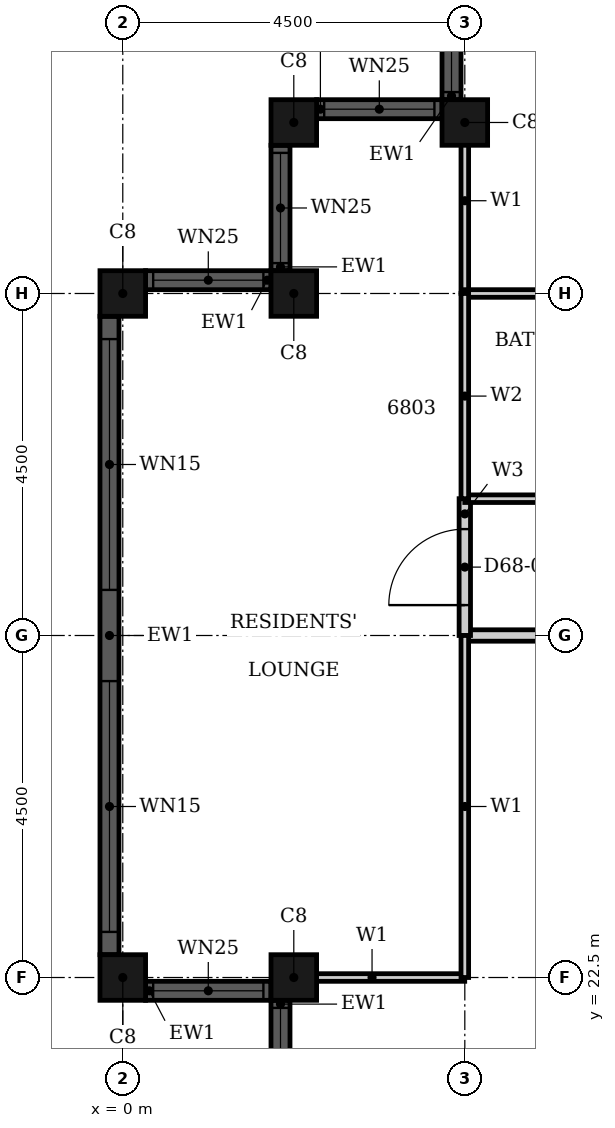
"""IFC4 building model, lengths in metres.
Left out: names, types, materials, properties, quantities, classifications, styles, units other than length and angle.
Written with IfcOpenShell. Run it as: python <this file> out.ifc"""

import sys

from ifc_helpers import new_model, si_unit, direction, frame, frame_2d, origin, origin_2d, place, context, subcontext, project, spatial, rectangle, hollow_rectangle, extrude, element, fill, save


model = new_model("IFC4")
c1 = context("Model", 3, precision=1e-05, world=origin(), true_north=direction((0.0, 1.0)))
c2 = subcontext(c1, "Body", "Model", "MODEL_VIEW")
j1 = project(units=[si_unit("LENGTHUNIT", "METRE"), si_unit("PLANEANGLEUNIT", "RADIAN")], contexts=[c1])
p1 = place(None, origin())
s1 = spatial("IfcSite", under=j1, at=p1, CompositionType="ELEMENT")
p2 = place(p1, origin())
s2 = spatial("IfcBuilding", under=s1, at=p2, CompositionType="ELEMENT")
p3 = place(p2, frame((0.0, 0.0, 267.5)))
s3 = spatial("IfcBuildingStorey", under=s2, at=p3, CompositionType="ELEMENT", Elevation=267.5)
for number, where, z_axis, x_axis in (
    (1, (4.5, 33.75, 0.0), (0.0, 0.0, 1.0), (1.0, 0.0, 0.0)),
    (2, (2.25, 33.75, 0.0), (0.0, 0.0, 1.0), (1.0, 0.0, 0.0)),
    (3, (2.25, 31.5, 0.0), (0.0, 0.0, 1.0), (1.0, 0.0, 0.0)),
    (4, (0.0, 31.5, 0.0), (0.0, 0.0, 1.0), (1.0, 0.0, 0.0)),
    (5, (0.0, 22.5, 0.0), (0.0, 0.0, 1.0), (1.0, 0.0, 0.0)),
    (6, (2.25, 22.5, 0.0), (0.0, 0.0, 1.0), (1.0, 0.0, 0.0)),
):
    element("IfcColumn", number, at=place(p3, frame(where, z_axis=z_axis, x_axis=x_axis)), inside=s3, PredefinedType="COLUMN", context=c2, shape_type="SweptSolid", body=[
        extrude(hollow_rectangle(XDim=0.6, YDim=0.6, WallThickness=0.02, at=origin_2d()), origin(), (0.0, 0.0, 1.0), 3.7),
    ])
p4 = place(p3, frame((4.325, 35.7, 0.0), z_axis=(0.0, 0.0, 1.0), x_axis=(0.0, -1.0, 0.0)))
e7 = element("IfcWall", 7, at=p4, inside=s3, PredefinedType="SOLIDWALL", context=c2, shape_type="SweptSolid", body=[
    extrude(rectangle(XDim=1.65, YDim=0.25, at=frame_2d((0.825, 0.0))), origin(), (0.0, 0.0, 1.0), 3.7),
])
p5 = place(p4, frame((0.1, 0.0, 0.9)))
e8 = element("IfcOpeningElement", 8, at=p5, cuts=e7, PredefinedType="OPENING", context=c2, shape_type="SweptSolid", body=[
    extrude(rectangle(XDim=1.45, YDim=1.85, at=frame_2d((0.725, 0.925))), frame((0.0, 0.135, 0.0), z_axis=(0.0, -1.0, 0.0), x_axis=(1.0, 0.0, 0.0)), (0.0, 0.0, 1.0), 0.27),
])
p6 = place(p3, frame((4.2, 33.925, 0.0), z_axis=(0.0, 0.0, 1.0), x_axis=(-1.0, 0.0, 0.0)))
e9 = element("IfcWall", 9, at=p6, inside=s3, PredefinedType="SOLIDWALL", context=c2, shape_type="SweptSolid", body=[
    extrude(rectangle(XDim=1.65, YDim=0.25, at=frame_2d((0.825, 0.0))), origin(), (0.0, 0.0, 1.0), 3.7),
])
p7 = place(p6, frame((0.1, 0.0, 0.9)))
e10 = element("IfcOpeningElement", 10, at=p7, cuts=e9, PredefinedType="OPENING", context=c2, shape_type="SweptSolid", body=[
    extrude(rectangle(XDim=1.45, YDim=1.85, at=frame_2d((0.725, 0.925))), frame((0.0, 0.135, 0.0), z_axis=(0.0, -1.0, 0.0), x_axis=(1.0, 0.0, 0.0)), (0.0, 0.0, 1.0), 0.27),
])
p8 = place(p3, frame((2.075, 33.45, 0.0), z_axis=(0.0, 0.0, 1.0), x_axis=(0.0, -1.0, 0.0)))
e11 = element("IfcWall", 11, at=p8, inside=s3, PredefinedType="SOLIDWALL", context=c2, shape_type="SweptSolid", body=[
    extrude(rectangle(XDim=1.65, YDim=0.25, at=frame_2d((0.825, 0.0))), origin(), (0.0, 0.0, 1.0), 3.7),
])
p9 = place(p8, frame((0.1, 0.0, 0.9)))
e12 = element("IfcOpeningElement", 12, at=p9, cuts=e11, PredefinedType="OPENING", context=c2, shape_type="SweptSolid", body=[
    extrude(rectangle(XDim=1.45, YDim=1.85, at=frame_2d((0.725, 0.925))), frame((0.0, 0.135, 0.0), z_axis=(0.0, -1.0, 0.0), x_axis=(1.0, 0.0, 0.0)), (0.0, 0.0, 1.0), 0.27),
])
p10 = place(p3, frame((1.95, 31.675, 0.0), z_axis=(0.0, 0.0, 1.0), x_axis=(-1.0, 0.0, 0.0)))
e13 = element("IfcWall", 13, at=p10, inside=s3, PredefinedType="SOLIDWALL", context=c2, shape_type="SweptSolid", body=[
    extrude(rectangle(XDim=1.65, YDim=0.25, at=frame_2d((0.825, 0.0))), origin(), (0.0, 0.0, 1.0), 3.7),
])
p11 = place(p10, frame((0.1, 0.0, 0.9)))
e14 = element("IfcOpeningElement", 14, at=p11, cuts=e13, PredefinedType="OPENING", context=c2, shape_type="SweptSolid", body=[
    extrude(rectangle(XDim=1.45, YDim=1.85, at=frame_2d((0.725, 0.925))), frame((0.0, 0.135, 0.0), z_axis=(0.0, -1.0, 0.0), x_axis=(1.0, 0.0, 0.0)), (0.0, 0.0, 1.0), 0.27),
])
p12 = place(p3, frame((-0.175, 31.2, 0.0), z_axis=(0.0, 0.0, 1.0), x_axis=(0.0, -1.0, 0.0)))
e15 = element("IfcWall", 15, at=p12, inside=s3, PredefinedType="SOLIDWALL", context=c2, shape_type="SweptSolid", body=[
    extrude(rectangle(XDim=8.4, YDim=0.25, at=frame_2d((4.2, 0.0))), origin(), (0.0, 0.0, 1.0), 3.7),
])
p13 = place(p12, frame((0.3, 0.0, 0.45)))
e16 = element("IfcOpeningElement", 16, at=p13, cuts=e15, PredefinedType="OPENING", context=c2, shape_type="SweptSolid", body=[
    extrude(rectangle(XDim=3.3, YDim=2.3, at=frame_2d((1.65, 1.15))), frame((0.0, 0.135, 0.0), z_axis=(0.0, -1.0, 0.0), x_axis=(1.0, 0.0, 0.0)), (0.0, 0.0, 1.0), 0.27),
])
p14 = place(p12, frame((4.8, 0.0, 0.45)))
e17 = element("IfcOpeningElement", 17, at=p14, cuts=e15, PredefinedType="OPENING", context=c2, shape_type="SweptSolid", body=[
    extrude(rectangle(XDim=3.3, YDim=2.3, at=frame_2d((1.65, 1.15))), frame((0.0, 0.135, 0.0), z_axis=(0.0, -1.0, 0.0), x_axis=(1.0, 0.0, 0.0)), (0.0, 0.0, 1.0), 0.27),
])
p15 = place(p3, frame((0.3, 22.325, 0.0), z_axis=(0.0, 0.0, 1.0), x_axis=(1.0, 0.0, 0.0)))
e18 = element("IfcWall", 18, at=p15, inside=s3, PredefinedType="SOLIDWALL", context=c2, shape_type="SweptSolid", body=[
    extrude(rectangle(XDim=1.65, YDim=0.25, at=frame_2d((0.825, 0.0))), origin(), (0.0, 0.0, 1.0), 3.7),
])
p16 = place(p15, frame((0.1, 0.0, 0.9)))
e19 = element("IfcOpeningElement", 19, at=p16, cuts=e18, PredefinedType="OPENING", context=c2, shape_type="SweptSolid", body=[
    extrude(rectangle(XDim=1.45, YDim=1.85, at=frame_2d((0.725, 0.925))), frame((0.0, 0.135, 0.0), z_axis=(0.0, -1.0, 0.0), x_axis=(1.0, 0.0, 0.0)), (0.0, 0.0, 1.0), 0.27),
])
p17 = place(p3, frame((2.075, 22.2, 0.0), z_axis=(0.0, 0.0, 1.0), x_axis=(0.0, -1.0, 0.0)))
e20 = element("IfcWall", 20, at=p17, inside=s3, PredefinedType="SOLIDWALL", context=c2, shape_type="SweptSolid", body=[
    extrude(rectangle(XDim=1.65, YDim=0.25, at=frame_2d((0.825, 0.0))), origin(), (0.0, 0.0, 1.0), 3.7),
])
p18 = place(p17, frame((0.1, 0.0, 0.9)))
e21 = element("IfcOpeningElement", 21, at=p18, cuts=e20, PredefinedType="OPENING", context=c2, shape_type="SweptSolid", body=[
    extrude(rectangle(XDim=1.45, YDim=1.85, at=frame_2d((0.725, 0.925))), frame((0.0, 0.135, 0.0), z_axis=(0.0, -1.0, 0.0), x_axis=(1.0, 0.0, 0.0)), (0.0, 0.0, 1.0), 0.27),
])
p19 = place(p3, frame((4.5, 27.0, 0.0), z_axis=(0.0, 0.0, 1.0), x_axis=(1.0, 0.0, 0.0)))
e22 = element("IfcWall", 22, at=p19, inside=s3, PredefinedType="PARTITIONING", context=c2, shape_type="SweptSolid", body=[
    extrude(rectangle(XDim=13.5, YDim=0.15, at=frame_2d((6.75, 0.0))), origin(), (0.0, 0.0, 1.0), 2.68),
])
p20 = place(p19, frame((5.35, 0.0, 0.0)))
e23 = element("IfcOpeningElement", 23, at=p20, cuts=e22, PredefinedType="OPENING", context=c2, shape_type="SweptSolid", body=[
    extrude(rectangle(XDim=1.0, YDim=2.1, at=frame_2d((0.5, 1.05))), frame((0.0, 0.085, 0.0), z_axis=(0.0, -1.0, 0.0), x_axis=(1.0, 0.0, 0.0)), (0.0, 0.0, 1.0), 0.17),
])
p21 = place(p3, frame((4.5, 27.0, 0.0), z_axis=(0.0, 0.0, 1.0), x_axis=(0.0, 1.0, 0.0)))
e24 = element("IfcWall", 24, at=p21, inside=s3, PredefinedType="PARTITIONING", context=c2, shape_type="SweptSolid", body=[
    extrude(rectangle(XDim=1.8, YDim=0.15, at=frame_2d((0.9, 0.0))), origin(), (0.0, 0.0, 1.0), 3.4),
])
p22 = place(p21, frame((0.4, 0.0, 0.0)))
e25 = element("IfcOpeningElement", 25, at=p22, cuts=e24, PredefinedType="OPENING", context=c2, shape_type="SweptSolid", body=[
    extrude(rectangle(XDim=1.0, YDim=2.1, at=frame_2d((0.5, 1.05))), frame((0.0, 0.085, 0.0), z_axis=(0.0, -1.0, 0.0), x_axis=(1.0, 0.0, 0.0)), (0.0, 0.0, 1.0), 0.17),
])
p23 = place(p3, frame((2.06, 22.5, 0.0), z_axis=(0.0, 0.0, 1.0), x_axis=(1.0, 0.0, 0.0)))
e26 = element("IfcWall", 26, at=p23, inside=s3, PredefinedType="PARTITIONING", context=c2, shape_type="SweptSolid", body=[
    extrude(rectangle(XDim=2.439, YDim=0.1, at=frame_2d((1.219, 0.0))), origin(), (0.0, 0.0, 1.0), 2.68),
])
p24 = place(p3, frame((4.5, 31.501, 0.0), z_axis=(0.0, 0.0, 1.0), x_axis=(0.0, 1.0, 0.0)))
e27 = element("IfcWall", 27, at=p24, inside=s3, PredefinedType="PARTITIONING", context=c2, shape_type="SweptSolid", body=[
    extrude(rectangle(XDim=2.439, YDim=0.1, at=frame_2d((1.219, 0.0))), origin(), (0.0, 0.0, 1.0), 3.4),
])
p25 = place(p3, frame((4.5, 22.5, 0.0), z_axis=(0.0, 0.0, 1.0), x_axis=(0.0, 1.0, 0.0)))
e28 = element("IfcWall", 28, at=p25, inside=s3, PredefinedType="PARTITIONING", context=c2, shape_type="SweptSolid", body=[
    extrude(rectangle(XDim=4.5, YDim=0.1, at=frame_2d((2.25, 0.0))), origin(), (0.0, 0.0, 1.0), 3.4),
])
p26 = place(p3, frame((4.5, 28.8, 0.0), z_axis=(0.0, 0.0, 1.0), x_axis=(1.0, 0.0, 0.0)))
e29 = element("IfcWall", 29, at=p26, inside=s3, PredefinedType="PARTITIONING", context=c2, shape_type="SweptSolid", body=[
    extrude(rectangle(XDim=2.4, YDim=0.1, at=frame_2d((1.2, 0.0))), origin(), (0.0, 0.0, 1.0), 3.4),
])
p27 = place(p3, frame((4.5, 31.5, 0.0), z_axis=(0.0, 0.0, 1.0), x_axis=(1.0, 0.0, 0.0)))
e30 = element("IfcWall", 30, at=p27, inside=s3, PredefinedType="PARTITIONING", context=c2, shape_type="SweptSolid", body=[
    extrude(rectangle(XDim=2.4, YDim=0.1, at=frame_2d((1.2, 0.0))), origin(), (0.0, 0.0, 1.0), 2.68),
])
p28 = place(p3, frame((4.5, 28.8, 0.0), z_axis=(0.0, 0.0, 1.0), x_axis=(0.0, 1.0, 0.0)))
e31 = element("IfcWall", 31, at=p28, inside=s3, PredefinedType="PARTITIONING", context=c2, shape_type="SweptSolid", body=[
    extrude(rectangle(XDim=2.7, YDim=0.1, at=frame_2d((1.35, 0.0))), origin(), (0.0, 0.0, 1.0), 3.4),
])
p29 = place(p5, origin())
e32 = element("IfcWindow", 32, at=p29, inside=s3, PartitioningType="SINGLE_PANEL", PredefinedType="WINDOW", context=c2, shape_type="SweptSolid", body=[
    extrude(rectangle(XDim=1.45, YDim=1.85, at=frame_2d((0.725, 0.925))), frame((0.0, 0.03, 0.0), z_axis=(0.0, -1.0, 0.0), x_axis=(1.0, 0.0, 0.0)), (0.0, 0.0, 1.0), 0.06),
])
fill(e8, e32)
p30 = place(p7, origin())
e33 = element("IfcWindow", 33, at=p30, inside=s3, PartitioningType="SINGLE_PANEL", PredefinedType="WINDOW", context=c2, shape_type="SweptSolid", body=[
    extrude(rectangle(XDim=1.45, YDim=1.85, at=frame_2d((0.725, 0.925))), frame((0.0, 0.03, 0.0), z_axis=(0.0, -1.0, 0.0), x_axis=(1.0, 0.0, 0.0)), (0.0, 0.0, 1.0), 0.06),
])
fill(e10, e33)
p31 = place(p9, origin())
e34 = element("IfcWindow", 34, at=p31, inside=s3, PartitioningType="SINGLE_PANEL", PredefinedType="WINDOW", context=c2, shape_type="SweptSolid", body=[
    extrude(rectangle(XDim=1.45, YDim=1.85, at=frame_2d((0.725, 0.925))), frame((0.0, 0.03, 0.0), z_axis=(0.0, -1.0, 0.0), x_axis=(1.0, 0.0, 0.0)), (0.0, 0.0, 1.0), 0.06),
])
fill(e12, e34)
p32 = place(p11, origin())
e35 = element("IfcWindow", 35, at=p32, inside=s3, PartitioningType="SINGLE_PANEL", PredefinedType="WINDOW", context=c2, shape_type="SweptSolid", body=[
    extrude(rectangle(XDim=1.45, YDim=1.85, at=frame_2d((0.725, 0.925))), frame((0.0, 0.03, 0.0), z_axis=(0.0, -1.0, 0.0), x_axis=(1.0, 0.0, 0.0)), (0.0, 0.0, 1.0), 0.06),
])
fill(e14, e35)
p33 = place(p13, origin())
e36 = element("IfcWindow", 36, at=p33, inside=s3, PartitioningType="SINGLE_PANEL", PredefinedType="WINDOW", context=c2, shape_type="SweptSolid", body=[
    extrude(rectangle(XDim=3.3, YDim=2.3, at=frame_2d((1.65, 1.15))), frame((0.0, 0.03, 0.0), z_axis=(0.0, -1.0, 0.0), x_axis=(1.0, 0.0, 0.0)), (0.0, 0.0, 1.0), 0.06),
])
fill(e16, e36)
p34 = place(p14, origin())
e37 = element("IfcWindow", 37, at=p34, inside=s3, PartitioningType="SINGLE_PANEL", PredefinedType="WINDOW", context=c2, shape_type="SweptSolid", body=[
    extrude(rectangle(XDim=3.3, YDim=2.3, at=frame_2d((1.65, 1.15))), frame((0.0, 0.03, 0.0), z_axis=(0.0, -1.0, 0.0), x_axis=(1.0, 0.0, 0.0)), (0.0, 0.0, 1.0), 0.06),
])
fill(e17, e37)
p35 = place(p16, origin())
e38 = element("IfcWindow", 38, at=p35, inside=s3, PartitioningType="SINGLE_PANEL", PredefinedType="WINDOW", context=c2, shape_type="SweptSolid", body=[
    extrude(rectangle(XDim=1.45, YDim=1.85, at=frame_2d((0.725, 0.925))), frame((0.0, 0.03, 0.0), z_axis=(0.0, -1.0, 0.0), x_axis=(1.0, 0.0, 0.0)), (0.0, 0.0, 1.0), 0.06),
])
fill(e19, e38)
p36 = place(p18, origin())
e39 = element("IfcWindow", 39, at=p36, inside=s3, PartitioningType="SINGLE_PANEL", PredefinedType="WINDOW", context=c2, shape_type="SweptSolid", body=[
    extrude(rectangle(XDim=1.45, YDim=1.85, at=frame_2d((0.725, 0.925))), frame((0.0, 0.03, 0.0), z_axis=(0.0, -1.0, 0.0), x_axis=(1.0, 0.0, 0.0)), (0.0, 0.0, 1.0), 0.06),
])
fill(e21, e39)
p37 = place(p22, origin())
e40 = element("IfcDoor", 40, at=p37, inside=s3, OperationType="SINGLE_SWING_RIGHT", PredefinedType="DOOR", context=c2, shape_type="SweptSolid", body=[
    extrude(rectangle(XDim=1.0, YDim=2.1, at=frame_2d((0.5, 1.05))), frame((0.0, 0.025, 0.0), z_axis=(0.0, -1.0, 0.0), x_axis=(1.0, 0.0, 0.0)), (0.0, 0.0, 1.0), 0.05),
])
fill(e25, e40)
save(model, sys.argv[1])
